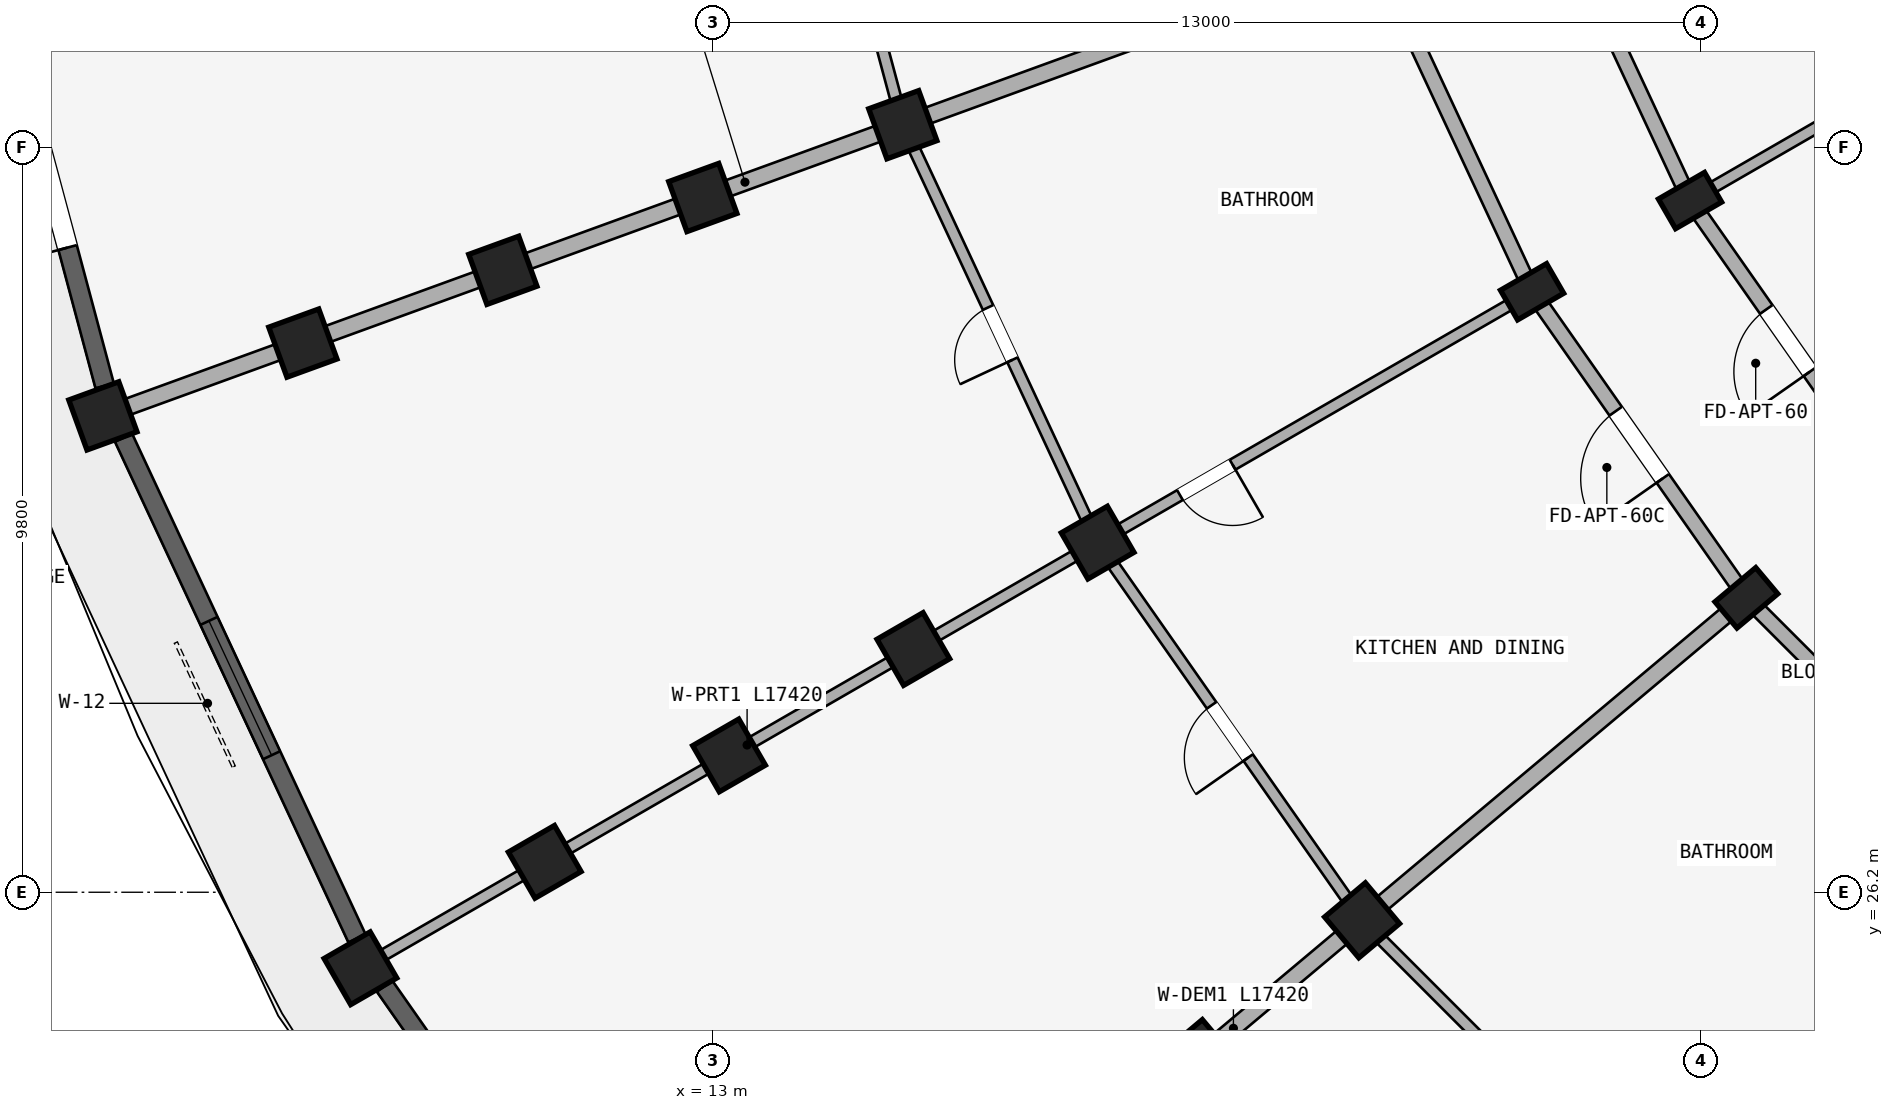
"""IFC4 building model, lengths in metres.
Left out: names, types, materials, properties, quantities, classifications, styles, units other than length and angle.
Written with IfcOpenShell. Run it as: python <this file> out.ifc"""

import sys

from ifc_helpers import new_model, si_unit, direction, frame, frame_2d, origin, origin_2d, place, context, subcontext, project, spatial, rectangle, extrude, element, fill, save


model = new_model("IFC4")
c1 = context("Model", 3, precision=1e-05, world=origin(), true_north=direction((0.0, 1.0)))
c2 = subcontext(c1, "Body", "Model", "MODEL_VIEW")
j1 = project(units=[si_unit("LENGTHUNIT", "METRE"), si_unit("PLANEANGLEUNIT", "RADIAN")], contexts=[c1])
p1 = place(None, origin())
s1 = spatial("IfcSite", under=j1, at=p1, CompositionType="ELEMENT")
p2 = place(p1, origin())
s2 = spatial("IfcBuilding", under=s1, at=p2, CompositionType="ELEMENT")
p3 = place(p2, frame((0.0, 0.0, 18.15)))
s3 = spatial("IfcBuildingStorey", under=s2, at=p3, CompositionType="ELEMENT", Elevation=18.15)
p4 = place(p3, frame((26.598, 30.073, 0.0), z_axis=(0.0, 0.0, 1.0), x_axis=(-0.642787609687, 0.766044443119, 0.0)))
e1 = element("IfcColumn", 1, at=p4, inside=s3, PredefinedType="COLUMN", context=c2, shape_type="SweptSolid", body=[
    extrude(rectangle(XDim=0.45, YDim=0.7, at=origin_2d()), origin(), (0.0, 0.0, 1.0), 2.93),
])
for number, where, z_axis, x_axis in (
    (2, (21.542, 25.831, 0.0), (0.0, 0.0, 1.0), (-0.643, 0.766, 0.0)),
    (3, (19.397, 24.031, 0.0), (0.0, 0.0, 1.0), (-0.643, 0.766, 0.0)),
):
    element("IfcColumn", number, at=place(p3, frame(where, z_axis=z_axis, x_axis=x_axis)), inside=s3, PredefinedType="COLUMN", context=c2, shape_type="SweptSolid", body=[
        extrude(rectangle(XDim=0.7, YDim=0.7, at=origin_2d()), origin(), (0.0, 0.0, 1.0), 2.93),
    ])
for number, where, z_axis, x_axis in (
    (4, (25.856, 35.3, 0.0), (0.0, 0.0, 1.0), (-0.5, 0.866, 0.0)),
    (5, (23.778, 34.1, 0.0), (0.0, 0.0, 1.0), (-0.5, 0.866, 0.0)),
):
    element("IfcColumn", number, at=place(p3, frame(where, z_axis=z_axis, x_axis=x_axis)), inside=s3, PredefinedType="COLUMN", context=c2, shape_type="SweptSolid", body=[
        extrude(rectangle(XDim=0.45, YDim=0.7, at=origin_2d()), origin(), (0.0, 0.0, 1.0), 2.93),
    ])
for number, where, z_axis, x_axis in (
    (6, (18.062, 30.8, 0.0), (0.0, 0.0, 1.0), (-0.5, 0.866, 0.0)),
    (7, (15.637, 29.4, 0.0), (0.0, 0.0, 1.0), (-0.5, 0.866, 0.0)),
    (8, (13.213, 28.0, 0.0), (0.0, 0.0, 1.0), (-0.5, 0.866, 0.0)),
    (9, (10.788, 26.6, 0.0), (0.0, 0.0, 1.0), (-0.5, 0.866, 0.0)),
):
    element("IfcColumn", number, at=place(p3, frame(where, z_axis=z_axis, x_axis=x_axis)), inside=s3, PredefinedType="COLUMN", context=c2, shape_type="SweptSolid", body=[
        extrude(rectangle(XDim=0.7, YDim=0.7, at=origin_2d()), origin(), (0.0, 0.0, 1.0), 2.93),
    ])
p5 = place(p3, frame((8.363, 25.2, 0.0), z_axis=(0.0, 0.0, 1.0), x_axis=(-0.5, 0.866025403784, 0.0)))
e10 = element("IfcColumn", 10, at=p5, inside=s3, PredefinedType="COLUMN", context=c2, shape_type="SweptSolid", body=[
    extrude(rectangle(XDim=0.7, YDim=0.7, at=origin_2d()), origin(), (0.0, 0.0, 1.0), 2.97),
])
for number, where, z_axis, x_axis in (
    (11, (15.499, 36.298, 0.0), (0.0, 0.0, 1.0), (-0.342, 0.94, 0.0)),
    (12, (12.868, 35.34, 0.0), (0.0, 0.0, 1.0), (-0.342, 0.94, 0.0)),
    (13, (10.236, 34.382, 0.0), (0.0, 0.0, 1.0), (-0.342, 0.94, 0.0)),
    (14, (7.605, 33.425, 0.0), (0.0, 0.0, 1.0), (-0.342, 0.94, 0.0)),
):
    element("IfcColumn", number, at=place(p3, frame(where, z_axis=z_axis, x_axis=x_axis)), inside=s3, PredefinedType="COLUMN", context=c2, shape_type="SweptSolid", body=[
        extrude(rectangle(XDim=0.7, YDim=0.7, at=origin_2d()), origin(), (0.0, 0.0, 1.0), 2.93),
    ])
p6 = place(p3, frame((4.974, 32.467, 0.0), z_axis=(0.0, 0.0, 1.0), x_axis=(-0.342020143326, 0.939692620786, 0.0)))
e15 = element("IfcColumn", 15, at=p6, inside=s3, PredefinedType="COLUMN", context=c2, shape_type="SweptSolid", body=[
    extrude(rectangle(XDim=0.7, YDim=0.7, at=origin_2d()), origin(), (0.0, 0.0, 1.0), 2.97),
])
p7 = place(p3, frame((30.073, 26.598, 0.0), z_axis=(0.0, 0.0, 1.0), x_axis=(-0.707106781187, 0.707106781187, 0.0)))
e16 = element("IfcWall", 16, at=p7, inside=s3, PredefinedType="STANDARD", context=c2, shape_type="SweptSolid", body=[
    extrude(rectangle(XDim=4.916, YDim=0.2, at=frame_2d((2.458, 0.0))), origin(), (0.0, 0.0, 1.0), 2.372),
])
p8 = place(p3, frame((28.436, 31.616, 0.0), z_axis=(0.0, 0.0, 1.0), x_axis=(-0.573571637217, 0.819155404658, 0.0)))
e17 = element("IfcWall", 17, at=p8, inside=s3, PredefinedType="STANDARD", context=c2, shape_type="SweptSolid", body=[
    extrude(rectangle(XDim=4.497, YDim=0.2, at=frame_2d((2.249, 0.0))), origin(), (0.0, 0.0, 1.0), 2.372),
])
p9 = place(p8, frame((1.749, 0.0, 0.0)))
e18 = element("IfcOpeningElement", 18, at=p9, cuts=e17, PredefinedType="OPENING", context=c2, shape_type="SweptSolid", body=[
    extrude(rectangle(XDim=1.0, YDim=2.15, at=frame_2d((0.5, 1.075))), frame((0.0, 0.11, 0.0), z_axis=(0.0, -1.0, 0.0), x_axis=(1.0, 0.0, 0.0)), (0.0, 0.0, 1.0), 0.22),
])
p10 = place(p3, frame((26.598, 30.073, 0.0), z_axis=(0.0, 0.0, 1.0), x_axis=(-0.573592335331, 0.819140911474, 0.0)))
e19 = element("IfcWall", 19, at=p10, inside=s3, PredefinedType="STANDARD", context=c2, shape_type="SweptSolid", body=[
    extrude(rectangle(XDim=4.916, YDim=0.2, at=frame_2d((2.458, 0.0))), origin(), (0.0, 0.0, 1.0), 2.372),
])
p11 = place(p10, frame((1.918, 0.0, 0.0)))
e20 = element("IfcOpeningElement", 20, at=p11, cuts=e19, PredefinedType="OPENING", context=c2, shape_type="SweptSolid", body=[
    extrude(rectangle(XDim=1.08, YDim=2.15, at=frame_2d((0.54, 1.075))), frame((0.0, 0.11, 0.0), z_axis=(0.0, -1.0, 0.0), x_axis=(1.0, 0.0, 0.0)), (0.0, 0.0, 1.0), 0.22),
])
p12 = place(p3, frame((25.856, 35.3, 0.0), z_axis=(0.0, 0.0, 1.0), x_axis=(-0.422617978463, 0.906307919131, 0.0)))
e21 = element("IfcWall", 21, at=p12, inside=s3, PredefinedType="STANDARD", context=c2, shape_type="SweptSolid", body=[
    extrude(rectangle(XDim=4.497, YDim=0.2, at=frame_2d((2.249, 0.0))), origin(), (0.0, 0.0, 1.0), 2.372),
])
p13 = place(p3, frame((23.778, 34.1, 0.0), z_axis=(0.0, 0.0, 1.0), x_axis=(-0.422629854778, 0.906302381024, 0.0)))
e22 = element("IfcWall", 22, at=p13, inside=s3, PredefinedType="STANDARD", context=c2, shape_type="SweptSolid", body=[
    extrude(rectangle(XDim=4.915, YDim=0.2, at=frame_2d((2.458, 0.0))), origin(), (0.0, 0.0, 1.0), 2.372),
])
p14 = place(p3, frame((30.009, 26.521, 0.0), z_axis=(0.0, 0.0, 1.0), x_axis=(-0.642784757967, -0.766046835987, 0.0)))
e23 = element("IfcWall", 23, at=p14, inside=s3, PredefinedType="PARTITIONING", context=c2, shape_type="SweptSolid", body=[
    extrude(rectangle(XDim=17.42, YDim=0.15, at=frame_2d((8.71, 0.0))), origin(), (0.0, 0.0, 1.0), 2.372),
])
p15 = place(p14, frame((4.45, 0.0, 0.0)))
e24 = element("IfcOpeningElement", 24, at=p15, cuts=e23, PredefinedType="OPENING", context=c2, shape_type="SweptSolid", body=[
    extrude(rectangle(XDim=0.8, YDim=2.1, at=frame_2d((0.4, 1.05))), frame((0.0, 0.085, 0.0), z_axis=(0.0, -1.0, 0.0), x_axis=(1.0, 0.0, 0.0)), (0.0, 0.0, 1.0), 0.17),
])
p16 = place(p3, frame((26.521, 30.009, 0.0), z_axis=(0.0, 0.0, 1.0), x_axis=(-0.766046835987, -0.642784757967, 0.0)))
e25 = element("IfcWall", 25, at=p16, inside=s3, PredefinedType="STANDARD", context=c2, shape_type="SweptSolid", body=[
    extrude(rectangle(XDim=17.42, YDim=0.22, at=frame_2d((8.71, 0.0))), origin(), (0.0, 0.0, 1.0), 2.372),
])
p17 = place(p3, frame((31.746, 38.7, 0.0), z_axis=(0.0, 0.0, 1.0), x_axis=(-0.866026575979, -0.499997969693, 0.0)))
e26 = element("IfcWall", 26, at=p17, inside=s3, PredefinedType="PARTITIONING", context=c2, shape_type="SweptSolid", body=[
    extrude(rectangle(XDim=6.75, YDim=0.15, at=frame_2d((3.375, 0.0))), origin(), (0.0, 0.0, 1.0), 2.372),
])
p18 = place(p17, frame((3.262, 0.0, 0.0)))
e27 = element("IfcOpeningElement", 27, at=p18, cuts=e26, PredefinedType="OPENING", context=c2, shape_type="SweptSolid", body=[
    extrude(rectangle(XDim=0.9, YDim=2.1, at=frame_2d((0.45, 1.05))), frame((0.0, 0.085, 0.0), z_axis=(0.0, -1.0, 0.0), x_axis=(1.0, 0.0, 0.0)), (0.0, 0.0, 1.0), 0.17),
])
p19 = place(p3, frame((23.691, 34.05, 0.0), z_axis=(0.0, 0.0, 1.0), x_axis=(-0.866026648973, -0.499997843263, 0.0)))
e28 = element("IfcWall", 28, at=p19, inside=s3, PredefinedType="PARTITIONING", context=c2, shape_type="SweptSolid", body=[
    extrude(rectangle(XDim=17.42, YDim=0.15, at=frame_2d((8.71, 0.0))), origin(), (0.0, 0.0, 1.0), 2.372),
])
p20 = place(p19, frame((4.45, 0.0, 0.0)))
e29 = element("IfcOpeningElement", 29, at=p20, cuts=e28, PredefinedType="OPENING", context=c2, shape_type="SweptSolid", body=[
    extrude(rectangle(XDim=0.8, YDim=2.1, at=frame_2d((0.4, 1.05))), frame((0.0, 0.085, 0.0), z_axis=(0.0, -1.0, 0.0), x_axis=(1.0, 0.0, 0.0)), (0.0, 0.0, 1.0), 0.17),
])
p21 = place(p3, frame((21.607, 38.521, 0.0), z_axis=(0.0, 0.0, 1.0), x_axis=(-0.939691901159, -0.342022120477, 0.0)))
e30 = element("IfcWall", 30, at=p21, inside=s3, PredefinedType="STANDARD", context=c2, shape_type="SweptSolid", body=[
    extrude(rectangle(XDim=17.42, YDim=0.22, at=frame_2d((8.71, 0.0))), origin(), (0.0, 0.0, 1.0), 2.372),
])
p22 = place(p3, frame((25.831, 21.542, 0.0), z_axis=(0.0, 0.0, 1.0), x_axis=(-0.707106781187, 0.707106781187, 0.0)))
e31 = element("IfcWall", 31, at=p22, inside=s3, PredefinedType="PLUMBINGWALL", context=c2, shape_type="SweptSolid", body=[
    extrude(rectangle(XDim=6.066, YDim=0.15, at=frame_2d((3.033, 0.0))), origin(), (0.0, 0.0, 1.0), 2.372),
])
p23 = place(p22, frame((2.633, 0.0, 0.0)))
e32 = element("IfcOpeningElement", 32, at=p23, cuts=e31, PredefinedType="OPENING", context=c2, shape_type="SweptSolid", body=[
    extrude(rectangle(XDim=0.8, YDim=2.1, at=frame_2d((0.4, 1.05))), frame((0.0, 0.085, 0.0), z_axis=(0.0, -1.0, 0.0), x_axis=(1.0, 0.0, 0.0)), (0.0, 0.0, 1.0), 0.17),
])
p24 = place(p3, frame((21.542, 25.831, 0.0), z_axis=(0.0, 0.0, 1.0), x_axis=(-0.573594691504, 0.81913926159, 0.0)))
e33 = element("IfcWall", 33, at=p24, inside=s3, PredefinedType="PLUMBINGWALL", context=c2, shape_type="SweptSolid", body=[
    extrude(rectangle(XDim=6.066, YDim=0.15, at=frame_2d((3.033, 0.0))), origin(), (0.0, 0.0, 1.0), 2.372),
])
p25 = place(p24, frame((2.613, 0.0, 0.0)))
e34 = element("IfcOpeningElement", 34, at=p25, cuts=e33, PredefinedType="OPENING", context=c2, shape_type="SweptSolid", body=[
    extrude(rectangle(XDim=0.84, YDim=2.1, at=frame_2d((0.42, 1.05))), frame((0.0, 0.085, 0.0), z_axis=(0.0, -1.0, 0.0), x_axis=(1.0, 0.0, 0.0)), (0.0, 0.0, 1.0), 0.17),
])
p26 = place(p3, frame((18.062, 30.8, 0.0), z_axis=(0.0, 0.0, 1.0), x_axis=(-0.42260781991, 0.906312656069, 0.0)))
e35 = element("IfcWall", 35, at=p26, inside=s3, PredefinedType="PLUMBINGWALL", context=c2, shape_type="SweptSolid", body=[
    extrude(rectangle(XDim=6.066, YDim=0.15, at=frame_2d((3.033, 0.0))), origin(), (0.0, 0.0, 1.0), 2.372),
])
p27 = place(p26, frame((2.653, 0.0, 0.0)))
e36 = element("IfcOpeningElement", 36, at=p27, cuts=e35, PredefinedType="OPENING", context=c2, shape_type="SweptSolid", body=[
    extrude(rectangle(XDim=0.76, YDim=2.05, at=frame_2d((0.38, 1.025))), frame((0.0, 0.085, 0.0), z_axis=(0.0, -1.0, 0.0), x_axis=(1.0, 0.0, 0.0)), (0.0, 0.0, 1.0), 0.17),
])
p28 = place(p3, frame((15.499, 36.298, 0.0), z_axis=(0.0, 0.0, 1.0), x_axis=(-0.258827283048, 0.965923618901, 0.0)))
e37 = element("IfcWall", 37, at=p28, inside=s3, PredefinedType="PLUMBINGWALL", context=c2, shape_type="SweptSolid", body=[
    extrude(rectangle(XDim=6.066, YDim=0.15, at=frame_2d((3.033, 0.0))), origin(), (0.0, 0.0, 1.0), 2.372),
])
p29 = place(p28, frame((2.633, 0.0, 0.0)))
e38 = element("IfcOpeningElement", 38, at=p29, cuts=e37, PredefinedType="OPENING", context=c2, shape_type="SweptSolid", body=[
    extrude(rectangle(XDim=0.8, YDim=2.1, at=frame_2d((0.4, 1.05))), frame((0.0, 0.085, 0.0), z_axis=(0.0, -1.0, 0.0), x_axis=(1.0, 0.0, 0.0)), (0.0, 0.0, 1.0), 0.17),
])
p30 = place(p3, frame((12.849, 19.011, 0.0), z_axis=(0.0, 0.0, 1.0), x_axis=(-0.573566061701, 0.819159308599, 0.0)))
e39 = element("IfcWall", 39, at=p30, inside=s3, PredefinedType="STANDARD", context=c2, shape_type="SweptSolid", body=[
    extrude(rectangle(XDim=7.267, YDim=0.25, at=frame_2d((3.633, 0.0))), origin(), (0.0, 0.0, 1.0), 2.412),
])
p31 = place(p30, frame((2.583, 0.0, 0.412)))
e40 = element("IfcOpeningElement", 40, at=p31, cuts=e39, PredefinedType="OPENING", context=c2, shape_type="SweptSolid", body=[
    extrude(rectangle(XDim=2.1, YDim=1.8, at=frame_2d((1.05, 0.9))), frame((0.0, 0.135, 0.0), z_axis=(0.0, -1.0, 0.0), x_axis=(1.0, 0.0, 0.0)), (0.0, 0.0, 1.0), 0.27),
])
p32 = place(p3, frame((8.317, 25.594, 0.0), z_axis=(0.0, 0.0, 1.0), x_axis=(-0.422627946127, 0.90630327107, 0.0)))
e41 = element("IfcWall", 41, at=p32, inside=s3, PredefinedType="STANDARD", context=c2, shape_type="SweptSolid", body=[
    extrude(rectangle(XDim=7.267, YDim=0.25, at=frame_2d((3.633, 0.0))), origin(), (0.0, 0.0, 1.0), 2.412),
])
p33 = place(p32, frame((2.658, 0.0, 0.362)))
e42 = element("IfcOpeningElement", 42, at=p33, cuts=e41, PredefinedType="OPENING", context=c2, shape_type="SweptSolid", body=[
    extrude(rectangle(XDim=1.95, YDim=1.85, at=frame_2d((0.975, 0.925))), frame((0.0, 0.135, 0.0), z_axis=(0.0, -1.0, 0.0), x_axis=(1.0, 0.0, 0.0)), (0.0, 0.0, 1.0), 0.27),
])
p34 = place(p3, frame((4.998, 32.863, 0.0), z_axis=(0.0, 0.0, 1.0), x_axis=(-0.258802140196, 0.965930355787, 0.0)))
e43 = element("IfcWall", 43, at=p34, inside=s3, PredefinedType="STANDARD", context=c2, shape_type="SweptSolid", body=[
    extrude(rectangle(XDim=7.267, YDim=0.25, at=frame_2d((3.633, 0.0))), origin(), (0.0, 0.0, 1.0), 2.412),
])
p35 = place(p34, frame((4.766, 0.0, 0.562)))
e44 = element("IfcOpeningElement", 44, at=p35, cuts=e43, PredefinedType="OPENING", context=c2, shape_type="SweptSolid", body=[
    extrude(rectangle(XDim=1.2, YDim=1.5, at=frame_2d((0.6, 0.75))), frame((0.0, 0.135, 0.0), z_axis=(0.0, -1.0, 0.0), x_axis=(1.0, 0.0, 0.0)), (0.0, 0.0, 1.0), 0.27),
])
p36 = place(p34, frame((1.883, 0.0, 0.0)))
e45 = element("IfcOpeningElement", 45, at=p36, cuts=e43, PredefinedType="OPENING", context=c2, shape_type="SweptSolid", body=[
    extrude(rectangle(XDim=1.32, YDim=2.15, at=frame_2d((0.66, 1.075))), frame((0.0, 0.135, 0.0), z_axis=(0.0, -1.0, 0.0), x_axis=(1.0, 0.0, 0.0)), (0.0, 0.0, 1.0), 0.27),
])
p37 = place(p33, origin())
e46 = element("IfcWindow", 46, at=p37, inside=s3, PartitioningType="DOUBLE_PANEL_VERTICAL", PredefinedType="WINDOW", context=c2, shape_type="SweptSolid", body=[
    extrude(rectangle(XDim=1.95, YDim=1.85, at=frame_2d((0.975, 0.925))), frame((0.0, 0.03, 0.0), z_axis=(0.0, -1.0, 0.0), x_axis=(1.0, 0.0, 0.0)), (0.0, 0.0, 1.0), 0.06),
])
fill(e42, e46)
p38 = place(p20, frame((0.8, 0.0, 0.0), z_axis=(0.0, 0.0, 1.0), x_axis=(-1.0, 0.0, 0.0)))
e47 = element("IfcDoor", 47, at=p38, inside=s3, OperationType="SINGLE_SWING_RIGHT", PredefinedType="DOOR", context=c2, shape_type="SweptSolid", body=[
    extrude(rectangle(XDim=0.8, YDim=2.1, at=frame_2d((0.4, 1.05))), frame((0.0, 0.025, 0.0), z_axis=(0.0, -1.0, 0.0), x_axis=(1.0, 0.0, 0.0)), (0.0, 0.0, 1.0), 0.05),
])
fill(e29, e47)
p39 = place(p11, frame((1.08, 0.0, 0.0), z_axis=(0.0, 0.0, 1.0), x_axis=(-1.0, 0.0, 0.0)))
e48 = element("IfcDoor", 48, at=p39, inside=s3, OperationType="SINGLE_SWING_RIGHT", PredefinedType="DOOR", context=c2, shape_type="SweptSolid", body=[
    extrude(rectangle(XDim=1.08, YDim=2.15, at=frame_2d((0.54, 1.075))), frame((0.0, 0.025, 0.0), z_axis=(0.0, -1.0, 0.0), x_axis=(1.0, 0.0, 0.0)), (0.0, 0.0, 1.0), 0.05),
])
fill(e20, e48)
p40 = place(p25, origin())
e49 = element("IfcDoor", 49, at=p40, inside=s3, OperationType="SINGLE_SWING_LEFT", PredefinedType="DOOR", context=c2, shape_type="SweptSolid", body=[
    extrude(rectangle(XDim=0.84, YDim=2.1, at=frame_2d((0.42, 1.05))), frame((0.0, 0.025, 0.0), z_axis=(0.0, -1.0, 0.0), x_axis=(1.0, 0.0, 0.0)), (0.0, 0.0, 1.0), 0.05),
])
fill(e34, e49)
p41 = place(p27, frame((0.76, 0.0, 0.0), z_axis=(0.0, 0.0, 1.0), x_axis=(-1.0, 0.0, 0.0)))
e50 = element("IfcDoor", 50, at=p41, inside=s3, OperationType="SINGLE_SWING_RIGHT", PredefinedType="DOOR", context=c2, shape_type="SweptSolid", body=[
    extrude(rectangle(XDim=0.76, YDim=2.05, at=frame_2d((0.38, 1.025))), frame((0.0, 0.025, 0.0), z_axis=(0.0, -1.0, 0.0), x_axis=(1.0, 0.0, 0.0)), (0.0, 0.0, 1.0), 0.05),
])
fill(e36, e50)
p42 = place(p9, frame((1.0, 0.0, 0.0), z_axis=(0.0, 0.0, 1.0), x_axis=(-1.0, 0.0, 0.0)))
e51 = element("IfcDoor", 51, at=p42, inside=s3, OperationType="SINGLE_SWING_RIGHT", PredefinedType="DOOR", context=c2, shape_type="SweptSolid", body=[
    extrude(rectangle(XDim=1.0, YDim=2.15, at=frame_2d((0.5, 1.075))), frame((0.0, 0.025, 0.0), z_axis=(0.0, -1.0, 0.0), x_axis=(1.0, 0.0, 0.0)), (0.0, 0.0, 1.0), 0.05),
])
fill(e18, e51)
p43 = place(p36, origin())
e52 = element("IfcDoor", 52, at=p43, inside=s3, OperationType="SINGLE_SWING_LEFT", PredefinedType="DOOR", context=c2, shape_type="SweptSolid", body=[
    extrude(rectangle(XDim=1.32, YDim=2.15, at=frame_2d((0.66, 1.075))), frame((0.0, 0.025, 0.0), z_axis=(0.0, -1.0, 0.0), x_axis=(1.0, 0.0, 0.0)), (0.0, 0.0, 1.0), 0.05),
])
fill(e45, e52)
save(model, sys.argv[1])
